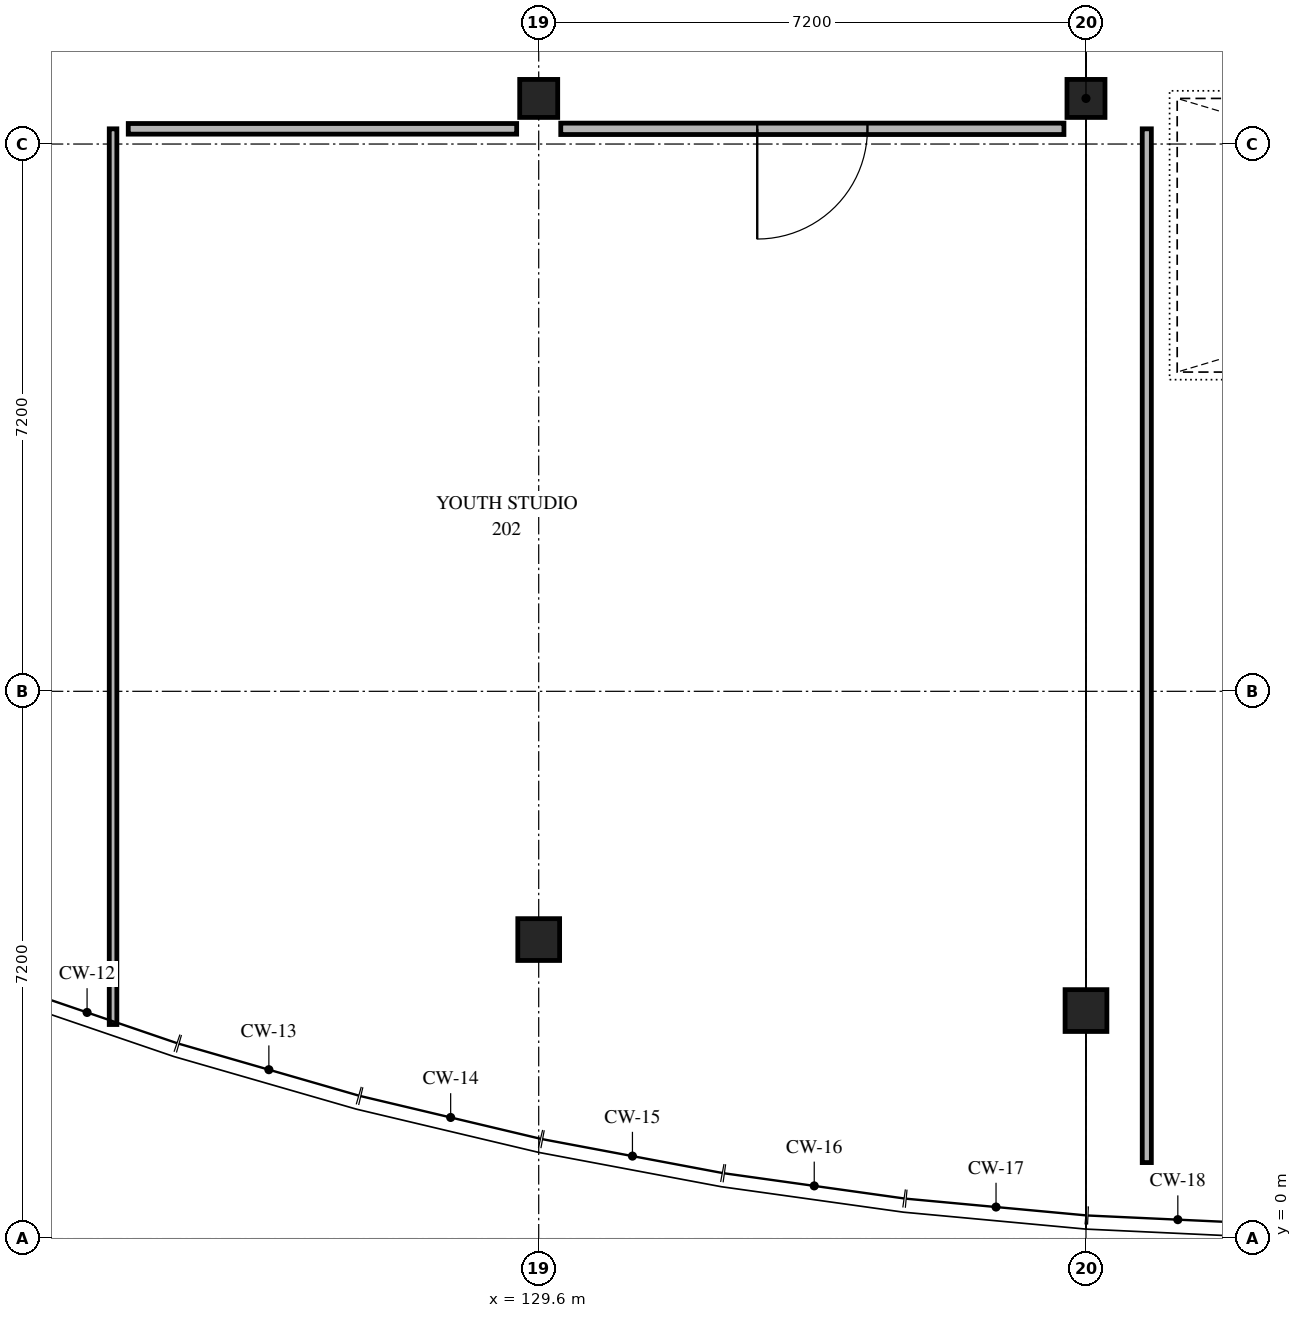
"""IFC4 building model, lengths in metres.
Left out: names, types, materials, properties, quantities, classifications, styles, units other than length and angle.
Written with IfcOpenShell. Run it as: python <this file> out.ifc"""

import sys

from ifc_helpers import new_model, si_unit, direction, frame, frame_2d, origin, origin_2d, place, context, subcontext, project, spatial, rectangle, extrude, element, fill, save


model = new_model("IFC4")
c1 = context("Model", 3, precision=1e-05, world=origin(), true_north=direction((0.0, 1.0)))
c2 = subcontext(c1, "Body", "Model", "MODEL_VIEW")
j1 = project(units=[si_unit("LENGTHUNIT", "METRE"), si_unit("PLANEANGLEUNIT", "RADIAN")], contexts=[c1])
p1 = place(None, origin())
s1 = spatial("IfcSite", under=j1, at=p1, CompositionType="ELEMENT")
p2 = place(p1, origin())
s2 = spatial("IfcBuilding", under=s1, at=p2, CompositionType="ELEMENT")
p3 = place(p2, frame((0.0, 0.0, 8.7)))
s3 = spatial("IfcBuildingStorey", under=s2, at=p3, CompositionType="ELEMENT", Elevation=8.7)
p4 = place(p3, frame((129.6, 3.934, 0.0), z_axis=(0.0, 0.0, 1.0), x_axis=(1.0, 0.0, 0.0)))
e1 = element("IfcColumn", 1, at=p4, inside=s3, PredefinedType="COLUMN", context=c2, shape_type="SweptSolid", body=[
    extrude(rectangle(XDim=0.55, YDim=0.55, at=origin_2d()), origin(), (0.0, 0.0, 1.0), 4.2),
])
p5 = place(p3, frame((129.6, 15.0, 0.0), z_axis=(0.0, 0.0, 1.0), x_axis=(1.0, 0.0, 0.0)))
e2 = element("IfcColumn", 2, at=p5, inside=s3, PredefinedType="COLUMN", context=c2, shape_type="SweptSolid", body=[
    extrude(rectangle(XDim=0.5, YDim=0.5, at=origin_2d()), origin(), (0.0, 0.0, 1.0), 4.2),
])
p6 = place(p3, frame((136.8, 3.0, 0.0), z_axis=(0.0, 0.0, 1.0), x_axis=(1.0, 0.0, 0.0)))
e3 = element("IfcColumn", 3, at=p6, inside=s3, PredefinedType="COLUMN", context=c2, shape_type="SweptSolid", body=[
    extrude(rectangle(XDim=0.55, YDim=0.55, at=origin_2d()), origin(), (0.0, 0.0, 1.0), 4.2),
])
p7 = place(p3, frame((136.8, 15.0, 0.0), z_axis=(0.0, 0.0, 1.0), x_axis=(1.0, 0.0, 0.0)))
e4 = element("IfcColumn", 4, at=p7, inside=s3, PredefinedType="COLUMN", context=c2, shape_type="SweptSolid", body=[
    extrude(rectangle(XDim=0.5, YDim=0.5, at=origin_2d()), origin(), (0.0, 0.0, 1.0), 4.2),
])
p8 = place(p3, frame((124.0, 2.816, 0.0), z_axis=(0.0, 0.0, 1.0), x_axis=(0.0, 1.0, 0.0)))
e5 = element("IfcWall", 5, at=p8, inside=s3, PredefinedType="PARTITIONING", context=c2, shape_type="SweptSolid", body=[
    extrude(rectangle(XDim=11.784, YDim=0.1, at=frame_2d((5.892, 0.0))), origin(), (0.0, 0.0, 1.0), 3.2),
])
p9 = place(p3, frame((136.51, 14.6, 0.0), z_axis=(0.0, 0.0, 1.0), x_axis=(-1.0, 0.0, 0.0)))
e6 = element("IfcWall", 6, at=p9, inside=s3, PredefinedType="PARTITIONING", context=c2, shape_type="SweptSolid", body=[
    extrude(rectangle(XDim=6.62, YDim=0.15, at=frame_2d((3.31, 0.0))), origin(), (0.0, 0.0, 1.0), 3.96),
])
p10 = place(p9, frame((2.585, 0.0, 0.0)))
e7 = element("IfcOpeningElement", 7, at=p10, cuts=e6, PredefinedType="OPENING", context=c2, shape_type="SweptSolid", body=[
    extrude(rectangle(XDim=1.45, YDim=2.25, at=frame_2d((0.725, 1.125))), frame((0.0, 0.085, 0.0), z_axis=(0.0, -1.0, 0.0), x_axis=(1.0, 0.0, 0.0)), (0.0, 0.0, 1.0), 0.17),
])
p11 = place(p3, frame((129.31, 14.6, 0.0), z_axis=(0.0, 0.0, 1.0), x_axis=(-1.0, 0.0, 0.0)))
e8 = element("IfcWall", 8, at=p11, inside=s3, PredefinedType="PARTITIONING", context=c2, shape_type="SweptSolid", body=[
    extrude(rectangle(XDim=5.11, YDim=0.14, at=frame_2d((2.555, 0.0))), origin(), (0.0, 0.0, 1.0), 3.96),
])
p12 = place(p3, frame((137.6, 1.0, 0.0), z_axis=(0.0, 0.0, 1.0), x_axis=(0.0, 1.0, 0.0)))
e9 = element("IfcWall", 9, at=p12, inside=s3, PredefinedType="PARTITIONING", context=c2, shape_type="SweptSolid", body=[
    extrude(rectangle(XDim=13.6, YDim=0.12, at=frame_2d((6.8, 0.0))), origin(), (0.0, 0.0, 1.0), 3.16),
])
p13 = place(p10, origin())
e10 = element("IfcDoor", 10, at=p13, inside=s3, OperationType="SINGLE_SWING_RIGHT", PredefinedType="DOOR", context=c2, shape_type="SweptSolid", body=[
    extrude(rectangle(XDim=1.45, YDim=2.25, at=frame_2d((0.725, 1.125))), frame((0.0, 0.025, 0.0), z_axis=(0.0, -1.0, 0.0), x_axis=(1.0, 0.0, 0.0)), (0.0, 0.0, 1.0), 0.05),
])
fill(e7, e10)
save(model, sys.argv[1])
